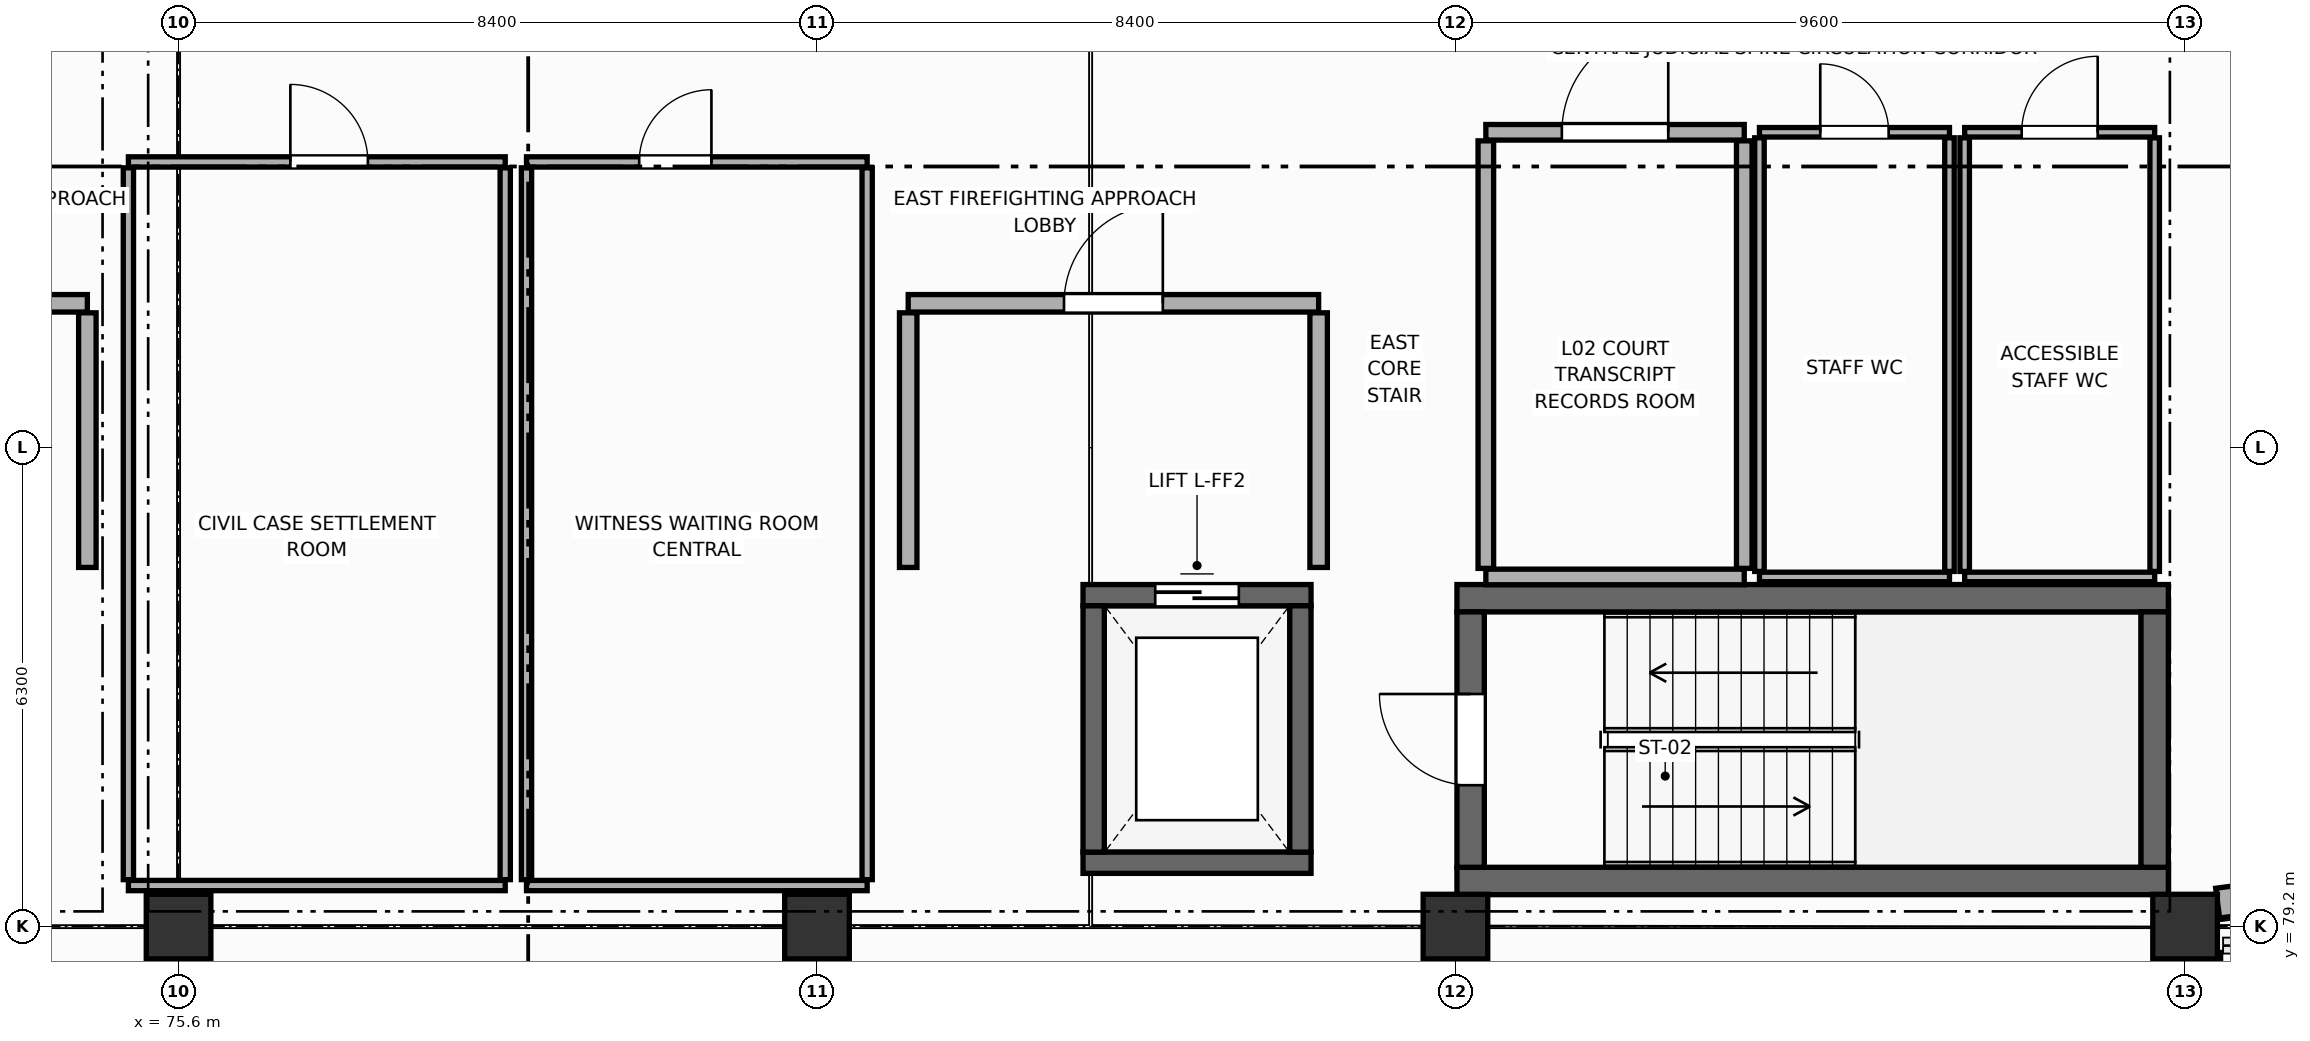
"""IFC4 building model, lengths in metres.
Left out: names, types, materials, properties, quantities, classifications, styles, units other than length and angle.
Written with IfcOpenShell. Run it as: python <this file> out.ifc"""

import sys

from ifc_helpers import new_model, si_unit, direction, frame, frame_2d, origin, origin_2d, place, context, subcontext, project, spatial, rectangle, extrude, element, fill, save


model = new_model("IFC4")
c1 = context("Model", 3, precision=1e-05, world=origin(), true_north=direction((0.0, 1.0)))
c2 = subcontext(c1, "Body", "Model", "MODEL_VIEW")
j1 = project(units=[si_unit("LENGTHUNIT", "METRE"), si_unit("PLANEANGLEUNIT", "RADIAN")], contexts=[c1])
p1 = place(None, origin())
s1 = spatial("IfcSite", under=j1, at=p1, CompositionType="ELEMENT")
p2 = place(p1, origin())
s2 = spatial("IfcBuilding", under=s1, at=p2, CompositionType="ELEMENT")
p3 = place(p2, frame((0.0, 0.0, 5.4)))
s3 = spatial("IfcBuildingStorey", under=s2, at=p3, CompositionType="ELEMENT", Elevation=5.4)
for number, where, z_axis, x_axis in (
    (1, (75.6, 79.2, 0.0), (0.0, 0.0, 1.0), (1.0, 0.0, 0.0)),
    (2, (84.0, 79.2, 0.0), (0.0, 0.0, 1.0), (1.0, 0.0, 0.0)),
    (3, (92.4, 79.2, 0.0), (0.0, 0.0, 1.0), (1.0, 0.0, 0.0)),
    (4, (102.0, 79.2, 0.0), (0.0, 0.0, 1.0), (1.0, 0.0, 0.0)),
):
    element("IfcColumn", number, at=place(p3, frame(where, z_axis=z_axis, x_axis=x_axis)), inside=s3, PredefinedType="COLUMN", context=c2, shape_type="SweptSolid", body=[
        extrude(rectangle(XDim=0.85, YDim=0.85, at=origin_2d()), origin(), (0.0, 0.0, 1.0), 4.5),
    ])
p4 = place(p3, frame((102.428, 79.509, 0.0), z_axis=(0.0, 0.0, 1.0), x_axis=(0.991443994311, 0.130532778046, 0.0)))
e5 = element("IfcWall", 5, at=p4, inside=s3, PredefinedType="ELEMENTEDWALL", context=c2, shape_type="SweptSolid", body=[
    extrude(rectangle(XDim=2.824, YDim=0.395, at=frame_2d((1.412, 0.0))), origin(), (0.0, 0.0, 1.0), 3.37),
])
p5 = place(p4, frame((0.962, 0.0, 0.85)))
e6 = element("IfcOpeningElement", 6, at=p5, cuts=e5, PredefinedType="OPENING", context=c2, shape_type="SweptSolid", body=[
    extrude(rectangle(XDim=0.9, YDim=1.85, at=frame_2d((0.45, 0.925))), frame((0.0, 0.208, 0.0), z_axis=(0.0, -1.0, 0.0), x_axis=(1.0, 0.0, 0.0)), (0.0, 0.0, 1.0), 0.415),
])
for number, where, z_axis, x_axis in (
    (7, (92.42, 83.52, 0.0), (0.0, 0.0, 1.0), (1.0, 0.0, 0.0)),
    (8, (101.78, 79.8, 0.0), (0.0, 0.0, 1.0), (-1.0, 0.0, 0.0)),
):
    element("IfcWall", number, at=place(p3, frame(where, z_axis=z_axis, x_axis=x_axis)), inside=s3, PredefinedType="SHEAR", context=c2, shape_type="SweptSolid", body=[
        extrude(rectangle(XDim=9.36, YDim=0.36, at=frame_2d((4.68, 0.0))), origin(), (0.0, 0.0, 1.0), 4.24),
    ])
p6 = place(p3, frame((92.6, 79.98, 0.0), z_axis=(0.0, 0.0, 1.0), x_axis=(0.0, 1.0, 0.0)))
e9 = element("IfcWall", 9, at=p6, inside=s3, PredefinedType="SHEAR", context=c2, shape_type="SweptSolid", body=[
    extrude(rectangle(XDim=3.36, YDim=0.36, at=frame_2d((1.68, 0.0))), origin(), (0.0, 0.0, 1.0), 4.24),
])
p7 = place(p6, frame((1.08, 0.0, 0.0)))
e10 = element("IfcOpeningElement", 10, at=p7, cuts=e9, PredefinedType="OPENING", context=c2, shape_type="SweptSolid", body=[
    extrude(rectangle(XDim=1.2, YDim=2.2, at=frame_2d((0.6, 1.1))), frame((0.0, 0.19, 0.0), z_axis=(0.0, -1.0, 0.0), x_axis=(1.0, 0.0, 0.0)), (0.0, 0.0, 1.0), 0.38),
])
p8 = place(p3, frame((101.6, 83.34, 0.0), z_axis=(0.0, 0.0, 1.0), x_axis=(0.0, -1.0, 0.0)))
e11 = element("IfcWall", 11, at=p8, inside=s3, PredefinedType="SHEAR", context=c2, shape_type="SweptSolid", body=[
    extrude(rectangle(XDim=3.36, YDim=0.36, at=frame_2d((1.68, 0.0))), origin(), (0.0, 0.0, 1.0), 4.24),
])
p9 = place(p3, frame((87.5, 83.56, 0.0), z_axis=(0.0, 0.0, 1.0), x_axis=(1.0, 0.0, 0.0)))
e12 = element("IfcWall", 12, at=p9, inside=s3, PredefinedType="SHEAR", context=c2, shape_type="SweptSolid", body=[
    extrude(rectangle(XDim=3.0, YDim=0.28, at=frame_2d((1.5, 0.0))), origin(), (0.0, 0.0, 1.0), 4.24),
])
p10 = place(p9, frame((0.95, 0.0, 0.0)))
e13 = element("IfcOpeningElement", 13, at=p10, cuts=e12, PredefinedType="OPENING", context=c2, shape_type="SweptSolid", body=[
    extrude(rectangle(XDim=1.1, YDim=2.2, at=frame_2d((0.55, 1.1))), frame((0.0, 0.15, 0.0), z_axis=(0.0, -1.0, 0.0), x_axis=(1.0, 0.0, 0.0)), (0.0, 0.0, 1.0), 0.3),
])
p11 = place(p3, frame((90.5, 80.04, 0.0), z_axis=(0.0, 0.0, 1.0), x_axis=(-1.0, 0.0, 0.0)))
e14 = element("IfcWall", 14, at=p11, inside=s3, PredefinedType="SHEAR", context=c2, shape_type="SweptSolid", body=[
    extrude(rectangle(XDim=3.0, YDim=0.28, at=frame_2d((1.5, 0.0))), origin(), (0.0, 0.0, 1.0), 4.24),
])
for number, where, z_axis, x_axis in (
    (15, (87.64, 80.18, 0.0), (0.0, 0.0, 1.0), (0.0, 1.0, 0.0)),
    (16, (90.36, 83.42, 0.0), (0.0, 0.0, 1.0), (0.0, -1.0, 0.0)),
):
    element("IfcWall", number, at=place(p3, frame(where, z_axis=z_axis, x_axis=x_axis)), inside=s3, PredefinedType="SHEAR", context=c2, shape_type="SweptSolid", body=[
        extrude(rectangle(XDim=3.24, YDim=0.28, at=frame_2d((1.62, 0.0))), origin(), (0.0, 0.0, 1.0), 4.24),
    ])
p12 = place(p3, frame((69.0, 87.4, 0.0), z_axis=(0.0, 0.0, 1.0), x_axis=(1.0, 0.0, 0.0)))
e17 = element("IfcWall", 17, at=p12, inside=s3, PredefinedType="STANDARD", context=c2, shape_type="SweptSolid", body=[
    extrude(rectangle(XDim=5.4, YDim=0.23, at=frame_2d((2.7, 0.0))), origin(), (0.0, 0.0, 1.0), 4.225),
])
p13 = place(p12, frame((2.05, 0.0, 0.0)))
e18 = element("IfcOpeningElement", 18, at=p13, cuts=e17, PredefinedType="OPENING", context=c2, shape_type="SweptSolid", body=[
    extrude(rectangle(XDim=1.3, YDim=2.2, at=frame_2d((0.65, 1.1))), frame((0.0, 0.125, 0.0), z_axis=(0.0, -1.0, 0.0), x_axis=(1.0, 0.0, 0.0)), (0.0, 0.0, 1.0), 0.25),
])
p14 = place(p3, frame((74.4, 87.275, 0.0), z_axis=(0.0, 0.0, 1.0), x_axis=(0.0, -1.0, 0.0)))
e19 = element("IfcWall", 19, at=p14, inside=s3, PredefinedType="STANDARD", context=c2, shape_type="SweptSolid", body=[
    extrude(rectangle(XDim=3.35, YDim=0.23, at=frame_2d((1.675, 0.0))), origin(), (0.0, 0.0, 1.0), 4.225),
])
p15 = place(p3, frame((85.2, 87.4, 0.0), z_axis=(0.0, 0.0, 1.0), x_axis=(1.0, 0.0, 0.0)))
e20 = element("IfcWall", 20, at=p15, inside=s3, PredefinedType="STANDARD", context=c2, shape_type="SweptSolid", body=[
    extrude(rectangle(XDim=5.4, YDim=0.23, at=frame_2d((2.7, 0.0))), origin(), (0.0, 0.0, 1.0), 3.62),
])
p16 = place(p15, frame((2.05, 0.0, 0.0)))
e21 = element("IfcOpeningElement", 21, at=p16, cuts=e20, PredefinedType="OPENING", context=c2, shape_type="SweptSolid", body=[
    extrude(rectangle(XDim=1.3, YDim=2.2, at=frame_2d((0.65, 1.1))), frame((0.0, 0.125, 0.0), z_axis=(0.0, -1.0, 0.0), x_axis=(1.0, 0.0, 0.0)), (0.0, 0.0, 1.0), 0.25),
])
for number, where, z_axis, x_axis in (
    (22, (85.2, 83.925, 0.0), (0.0, 0.0, 1.0), (0.0, 1.0, 0.0)),
    (23, (90.6, 87.275, 0.0), (0.0, 0.0, 1.0), (0.0, -1.0, 0.0)),
):
    element("IfcWall", number, at=place(p3, frame(where, z_axis=z_axis, x_axis=x_axis)), inside=s3, PredefinedType="STANDARD", context=c2, shape_type="SweptSolid", body=[
        extrude(rectangle(XDim=3.35, YDim=0.23, at=frame_2d((1.675, 0.0))), origin(), (0.0, 0.0, 1.0), 3.62),
    ])
p17 = place(p3, frame((96.4, 89.65, 0.0), z_axis=(0.0, 0.0, 1.0), x_axis=(1.0, 0.0, 0.0)))
e24 = element("IfcWall", 24, at=p17, inside=s3, PredefinedType="PARTITIONING", context=c2, shape_type="SweptSolid", body=[
    extrude(rectangle(XDim=2.5, YDim=0.125, at=frame_2d((1.25, 0.0))), origin(), (0.0, 0.0, 1.0), 4.225),
])
p18 = place(p17, frame((0.8, 0.0, 0.0)))
e25 = element("IfcOpeningElement", 25, at=p18, cuts=e24, PredefinedType="OPENING", context=c2, shape_type="SweptSolid", body=[
    extrude(rectangle(XDim=0.9, YDim=2.1, at=frame_2d((0.45, 1.05))), frame((0.0, 0.073, 0.0), z_axis=(0.0, -1.0, 0.0), x_axis=(1.0, 0.0, 0.0)), (0.0, 0.0, 1.0), 0.145),
])
p19 = place(p3, frame((98.9, 83.8, 0.0), z_axis=(0.0, 0.0, 1.0), x_axis=(-1.0, 0.0, 0.0)))
e26 = element("IfcWall", 26, at=p19, inside=s3, PredefinedType="PARTITIONING", context=c2, shape_type="SweptSolid", body=[
    extrude(rectangle(XDim=2.5, YDim=0.125, at=frame_2d((1.25, 0.0))), origin(), (0.0, 0.0, 1.0), 4.225),
])
for number, where, z_axis, x_axis in (
    (27, (96.4, 83.873, 0.0), (0.0, 0.0, 1.0), (0.0, 1.0, 0.0)),
    (28, (98.9, 89.577, 0.0), (0.0, 0.0, 1.0), (0.0, -1.0, 0.0)),
):
    element("IfcWall", number, at=place(p3, frame(where, z_axis=z_axis, x_axis=x_axis)), inside=s3, PredefinedType="PARTITIONING", context=c2, shape_type="SweptSolid", body=[
        extrude(rectangle(XDim=5.705, YDim=0.125, at=frame_2d((2.853, 0.0))), origin(), (0.0, 0.0, 1.0), 3.62),
    ])
p20 = place(p3, frame((99.1, 89.65, 0.0), z_axis=(0.0, 0.0, 1.0), x_axis=(1.0, 0.0, 0.0)))
e29 = element("IfcWall", 29, at=p20, inside=s3, PredefinedType="PARTITIONING", context=c2, shape_type="SweptSolid", body=[
    extrude(rectangle(XDim=2.5, YDim=0.125, at=frame_2d((1.25, 0.0))), origin(), (0.0, 0.0, 1.0), 3.37),
])
p21 = place(p20, frame((0.75, 0.0, 0.0)))
e30 = element("IfcOpeningElement", 30, at=p21, cuts=e29, PredefinedType="OPENING", context=c2, shape_type="SweptSolid", body=[
    extrude(rectangle(XDim=1.0, YDim=2.1, at=frame_2d((0.5, 1.05))), frame((0.0, 0.073, 0.0), z_axis=(0.0, -1.0, 0.0), x_axis=(1.0, 0.0, 0.0)), (0.0, 0.0, 1.0), 0.145),
])
p22 = place(p3, frame((101.6, 83.8, 0.0), z_axis=(0.0, 0.0, 1.0), x_axis=(-1.0, 0.0, 0.0)))
e31 = element("IfcWall", 31, at=p22, inside=s3, PredefinedType="PARTITIONING", context=c2, shape_type="SweptSolid", body=[
    extrude(rectangle(XDim=2.5, YDim=0.125, at=frame_2d((1.25, 0.0))), origin(), (0.0, 0.0, 1.0), 3.37),
])
p23 = place(p3, frame((99.1, 83.873, 0.0), z_axis=(0.0, 0.0, 1.0), x_axis=(0.0, 1.0, 0.0)))
e32 = element("IfcWall", 32, at=p23, inside=s3, PredefinedType="PARTITIONING", context=c2, shape_type="SweptSolid", body=[
    extrude(rectangle(XDim=5.705, YDim=0.125, at=frame_2d((2.853, 0.0))), origin(), (0.0, 0.0, 1.0), 3.62),
])
p24 = place(p3, frame((101.6, 89.577, 0.0), z_axis=(0.0, 0.0, 1.0), x_axis=(0.0, -1.0, 0.0)))
e33 = element("IfcWall", 33, at=p24, inside=s3, PredefinedType="PARTITIONING", context=c2, shape_type="SweptSolid", body=[
    extrude(rectangle(XDim=5.705, YDim=0.125, at=frame_2d((2.853, 0.0))), origin(), (0.0, 0.0, 1.0), 3.37),
])
p25 = place(p3, frame((92.8, 89.65, 0.0), z_axis=(0.0, 0.0, 1.0), x_axis=(1.0, 0.0, 0.0)))
e34 = element("IfcWall", 34, at=p25, inside=s3, PredefinedType="STANDARD", context=c2, shape_type="SweptSolid", body=[
    extrude(rectangle(XDim=3.4, YDim=0.205, at=frame_2d((1.7, 0.0))), origin(), (0.0, 0.0, 1.0), 3.37),
])
p26 = place(p25, frame((1.0, 0.0, 0.0)))
e35 = element("IfcOpeningElement", 35, at=p26, cuts=e34, PredefinedType="OPENING", context=c2, shape_type="SweptSolid", body=[
    extrude(rectangle(XDim=1.4, YDim=2.25, at=frame_2d((0.7, 1.125))), frame((0.0, 0.113, 0.0), z_axis=(0.0, -1.0, 0.0), x_axis=(1.0, 0.0, 0.0)), (0.0, 0.0, 1.0), 0.225),
])
p27 = place(p3, frame((96.2, 83.8, 0.0), z_axis=(0.0, 0.0, 1.0), x_axis=(-1.0, 0.0, 0.0)))
e36 = element("IfcWall", 36, at=p27, inside=s3, PredefinedType="STANDARD", context=c2, shape_type="SweptSolid", body=[
    extrude(rectangle(XDim=3.4, YDim=0.205, at=frame_2d((1.7, 0.0))), origin(), (0.0, 0.0, 1.0), 3.37),
])
p28 = place(p3, frame((92.8, 83.913, 0.0), z_axis=(0.0, 0.0, 1.0), x_axis=(0.0, 1.0, 0.0)))
e37 = element("IfcWall", 37, at=p28, inside=s3, PredefinedType="STANDARD", context=c2, shape_type="SweptSolid", body=[
    extrude(rectangle(XDim=5.625, YDim=0.205, at=frame_2d((2.812, 0.0))), origin(), (0.0, 0.0, 1.0), 3.37),
])
p29 = place(p3, frame((96.2, 89.538, 0.0), z_axis=(0.0, 0.0, 1.0), x_axis=(0.0, -1.0, 0.0)))
e38 = element("IfcWall", 38, at=p29, inside=s3, PredefinedType="STANDARD", context=c2, shape_type="SweptSolid", body=[
    extrude(rectangle(XDim=5.625, YDim=0.205, at=frame_2d((2.812, 0.0))), origin(), (0.0, 0.0, 1.0), 3.62),
])
p30 = place(p3, frame((102.4, 70.877, 0.0), z_axis=(0.0, 0.0, 1.0), x_axis=(0.0, 1.0, 0.0)))
e39 = element("IfcWall", 39, at=p30, inside=s3, PredefinedType="PARTITIONING", context=c2, shape_type="SweptSolid", body=[
    extrude(rectangle(XDim=7.983, YDim=0.135, at=frame_2d((3.991, 0.0))), origin(), (0.0, 0.0, 1.0), 3.33),
])
p31 = place(p3, frame((74.94, 89.26, 0.0), z_axis=(0.0, 0.0, 1.0), x_axis=(1.0, 0.0, 0.0)))
e40 = element("IfcWall", 40, at=p31, inside=s3, PredefinedType="PARTITIONING", context=c2, shape_type="SweptSolid", body=[
    extrude(rectangle(XDim=4.958, YDim=0.135, at=frame_2d((2.479, 0.0))), origin(), (0.0, 0.0, 1.0), 3.37),
])
p32 = place(p31, frame((2.131, 0.0, 0.0)))
e41 = element("IfcOpeningElement", 41, at=p32, cuts=e40, PredefinedType="OPENING", context=c2, shape_type="SweptSolid", body=[
    extrude(rectangle(XDim=1.02, YDim=2.15, at=frame_2d((0.51, 1.075))), frame((0.0, 0.077, 0.0), z_axis=(0.0, -1.0, 0.0), x_axis=(1.0, 0.0, 0.0)), (0.0, 0.0, 1.0), 0.155),
])
p33 = place(p3, frame((79.898, 79.74, 0.0), z_axis=(0.0, 0.0, 1.0), x_axis=(-1.0, 0.0, 0.0)))
e42 = element("IfcWall", 42, at=p33, inside=s3, PredefinedType="PARTITIONING", context=c2, shape_type="SweptSolid", body=[
    extrude(rectangle(XDim=4.958, YDim=0.135, at=frame_2d((2.479, 0.0))), origin(), (0.0, 0.0, 1.0), 3.37),
])
p34 = place(p3, frame((74.94, 79.817, 0.0), z_axis=(0.0, 0.0, 1.0), x_axis=(0.0, 1.0, 0.0)))
e43 = element("IfcWall", 43, at=p34, inside=s3, PredefinedType="PARTITIONING", context=c2, shape_type="SweptSolid", body=[
    extrude(rectangle(XDim=9.365, YDim=0.135, at=frame_2d((4.683, 0.0))), origin(), (0.0, 0.0, 1.0), 4.225),
])
p35 = place(p3, frame((79.898, 89.183, 0.0), z_axis=(0.0, 0.0, 1.0), x_axis=(0.0, -1.0, 0.0)))
e44 = element("IfcWall", 44, at=p35, inside=s3, PredefinedType="PARTITIONING", context=c2, shape_type="SweptSolid", body=[
    extrude(rectangle(XDim=9.365, YDim=0.135, at=frame_2d((4.683, 0.0))), origin(), (0.0, 0.0, 1.0), 3.62),
])
p36 = place(p3, frame((80.178, 89.26, 0.0), z_axis=(0.0, 0.0, 1.0), x_axis=(1.0, 0.0, 0.0)))
e45 = element("IfcWall", 45, at=p36, inside=s3, PredefinedType="PARTITIONING", context=c2, shape_type="SweptSolid", body=[
    extrude(rectangle(XDim=4.482, YDim=0.135, at=frame_2d((2.241, 0.0))), origin(), (0.0, 0.0, 1.0), 3.37),
])
p37 = place(p36, frame((1.483, 0.0, 0.0)))
e46 = element("IfcOpeningElement", 46, at=p37, cuts=e45, PredefinedType="OPENING", context=c2, shape_type="SweptSolid", body=[
    extrude(rectangle(XDim=0.95, YDim=2.15, at=frame_2d((0.475, 1.075))), frame((0.0, 0.077, 0.0), z_axis=(0.0, -1.0, 0.0), x_axis=(1.0, 0.0, 0.0)), (0.0, 0.0, 1.0), 0.155),
])
p38 = place(p3, frame((84.66, 79.74, 0.0), z_axis=(0.0, 0.0, 1.0), x_axis=(-1.0, 0.0, 0.0)))
e47 = element("IfcWall", 47, at=p38, inside=s3, PredefinedType="PARTITIONING", context=c2, shape_type="SweptSolid", body=[
    extrude(rectangle(XDim=4.482, YDim=0.135, at=frame_2d((2.241, 0.0))), origin(), (0.0, 0.0, 1.0), 3.37),
])
for number, where, z_axis, x_axis in (
    (48, (80.178, 79.817, 0.0), (0.0, 0.0, 1.0), (0.0, 1.0, 0.0)),
    (49, (84.66, 89.183, 0.0), (0.0, 0.0, 1.0), (0.0, -1.0, 0.0)),
):
    element("IfcWall", number, at=place(p3, frame(where, z_axis=z_axis, x_axis=x_axis)), inside=s3, PredefinedType="PARTITIONING", context=c2, shape_type="SweptSolid", body=[
        extrude(rectangle(XDim=9.365, YDim=0.135, at=frame_2d((4.683, 0.0))), origin(), (0.0, 0.0, 1.0), 3.62),
    ])
p39 = place(p7, origin())
e50 = element("IfcDoor", 50, at=p39, inside=s3, OperationType="SINGLE_SWING_RIGHT", PredefinedType="DOOR", context=c2, shape_type="SweptSolid", body=[
    extrude(rectangle(XDim=1.2, YDim=2.2, at=frame_2d((0.6, 1.1))), frame((0.0, 0.025, 0.0), z_axis=(0.0, -1.0, 0.0), x_axis=(1.0, 0.0, 0.0)), (0.0, 0.0, 1.0), 0.05),
])
fill(e10, e50)
p40 = place(p10, origin())
e51 = element("IfcDoor", 51, at=p40, inside=s3, OperationType="DOUBLE_DOOR_SLIDING", PredefinedType="DOOR", context=c2, shape_type="SweptSolid", body=[
    extrude(rectangle(XDim=1.1, YDim=2.2, at=frame_2d((0.55, 1.1))), frame((0.0, 0.025, 0.0), z_axis=(0.0, -1.0, 0.0), x_axis=(1.0, 0.0, 0.0)), (0.0, 0.0, 1.0), 0.05),
])
fill(e13, e51)
p41 = place(p16, origin())
e52 = element("IfcDoor", 52, at=p41, inside=s3, OperationType="SINGLE_SWING_RIGHT", PredefinedType="DOOR", context=c2, shape_type="SweptSolid", body=[
    extrude(rectangle(XDim=1.3, YDim=2.2, at=frame_2d((0.65, 1.1))), frame((0.0, 0.025, 0.0), z_axis=(0.0, -1.0, 0.0), x_axis=(1.0, 0.0, 0.0)), (0.0, 0.0, 1.0), 0.05),
])
fill(e21, e52)
p42 = place(p18, origin())
e53 = element("IfcDoor", 53, at=p42, inside=s3, OperationType="SINGLE_SWING_LEFT", PredefinedType="DOOR", context=c2, shape_type="SweptSolid", body=[
    extrude(rectangle(XDim=0.9, YDim=2.1, at=frame_2d((0.45, 1.05))), frame((0.0, 0.025, 0.0), z_axis=(0.0, -1.0, 0.0), x_axis=(1.0, 0.0, 0.0)), (0.0, 0.0, 1.0), 0.05),
])
fill(e25, e53)
p43 = place(p21, origin())
e54 = element("IfcDoor", 54, at=p43, inside=s3, OperationType="SINGLE_SWING_RIGHT", PredefinedType="DOOR", context=c2, shape_type="SweptSolid", body=[
    extrude(rectangle(XDim=1.0, YDim=2.1, at=frame_2d((0.5, 1.05))), frame((0.0, 0.025, 0.0), z_axis=(0.0, -1.0, 0.0), x_axis=(1.0, 0.0, 0.0)), (0.0, 0.0, 1.0), 0.05),
])
fill(e30, e54)
p44 = place(p26, origin())
e55 = element("IfcDoor", 55, at=p44, inside=s3, OperationType="SINGLE_SWING_RIGHT", PredefinedType="DOOR", context=c2, shape_type="SweptSolid", body=[
    extrude(rectangle(XDim=1.4, YDim=2.25, at=frame_2d((0.7, 1.125))), frame((0.0, 0.025, 0.0), z_axis=(0.0, -1.0, 0.0), x_axis=(1.0, 0.0, 0.0)), (0.0, 0.0, 1.0), 0.05),
])
fill(e35, e55)
p45 = place(p32, origin())
e56 = element("IfcDoor", 56, at=p45, inside=s3, OperationType="SINGLE_SWING_LEFT", PredefinedType="DOOR", context=c2, shape_type="SweptSolid", body=[
    extrude(rectangle(XDim=1.02, YDim=2.15, at=frame_2d((0.51, 1.075))), frame((0.0, 0.025, 0.0), z_axis=(0.0, -1.0, 0.0), x_axis=(1.0, 0.0, 0.0)), (0.0, 0.0, 1.0), 0.05),
])
fill(e41, e56)
p46 = place(p37, origin())
e57 = element("IfcDoor", 57, at=p46, inside=s3, OperationType="SINGLE_SWING_RIGHT", PredefinedType="DOOR", context=c2, shape_type="SweptSolid", body=[
    extrude(rectangle(XDim=0.95, YDim=2.15, at=frame_2d((0.475, 1.075))), frame((0.0, 0.025, 0.0), z_axis=(0.0, -1.0, 0.0), x_axis=(1.0, 0.0, 0.0)), (0.0, 0.0, 1.0), 0.05),
])
fill(e46, e57)
save(model, sys.argv[1])
